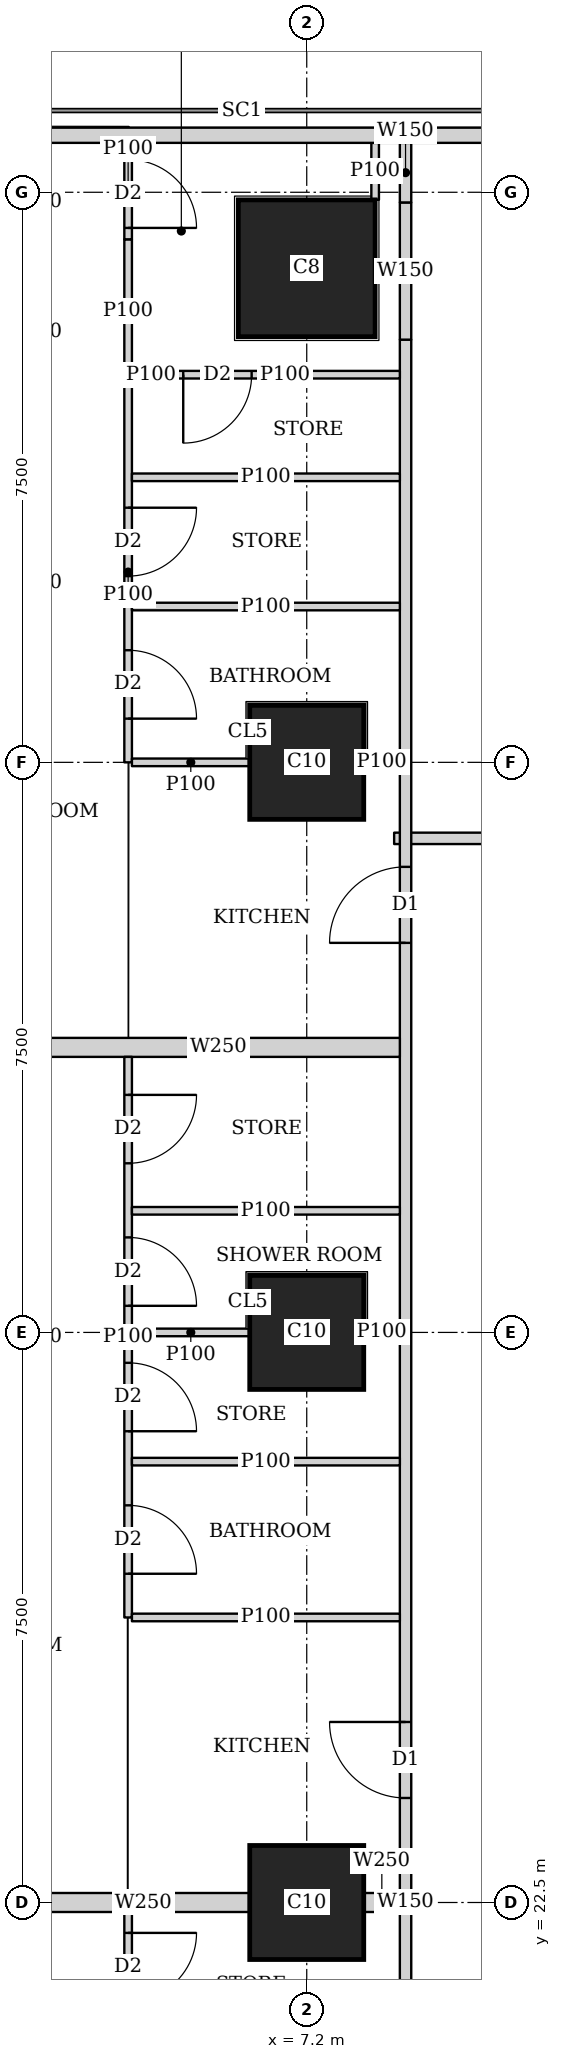
"""IFC4 building model, lengths in metres.
Left out: names, types, materials, properties, quantities, classifications, styles, units other than length and angle.
Written with IfcOpenShell. Run it as: python <this file> out.ifc"""

import sys

from ifc_helpers import new_model, si_unit, direction, frame, frame_2d, origin, origin_2d, place, context, subcontext, project, spatial, rectangle, extrude, element, fill, save


model = new_model("IFC4")
c1 = context("Model", 3, precision=1e-05, world=origin(), true_north=direction((0.0, 1.0)))
c2 = subcontext(c1, "Body", "Model", "MODEL_VIEW")
j1 = project(units=[si_unit("LENGTHUNIT", "METRE"), si_unit("PLANEANGLEUNIT", "RADIAN")], contexts=[c1])
p1 = place(None, origin())
s1 = spatial("IfcSite", under=j1, at=p1, CompositionType="ELEMENT")
p2 = place(p1, origin())
s2 = spatial("IfcBuilding", under=s1, at=p2, CompositionType="ELEMENT")
p3 = place(p2, frame((0.0, 0.0, 184.55)))
s3 = spatial("IfcBuildingStorey", under=s2, at=p3, CompositionType="ELEMENT", Elevation=184.55)
for number, where, z_axis, x_axis in (
    (1, (7.2, 22.5, 0.0), (0.0, 0.0, 1.0), (1.0, 0.0, 0.0)),
    (2, (7.2, 30.0, 0.0), (0.0, 0.0, 1.0), (1.0, 0.0, 0.0)),
    (3, (7.2, 37.5, 0.0), (0.0, 0.0, 1.0), (1.0, 0.0, 0.0)),
):
    element("IfcColumn", number, at=place(p3, frame(where, z_axis=z_axis, x_axis=x_axis)), inside=s3, PredefinedType="COLUMN", context=c2, shape_type="SweptSolid", body=[
        extrude(rectangle(XDim=1.5, YDim=1.5, at=origin_2d()), origin(), (0.0, 0.0, 1.0), 3.75),
    ])
p4 = place(p3, frame((7.2, 44.0, 0.0), z_axis=(0.0, 0.0, 1.0), x_axis=(1.0, 0.0, 0.0)))
e4 = element("IfcColumn", 4, at=p4, inside=s3, PredefinedType="COLUMN", context=c2, shape_type="SweptSolid", body=[
    extrude(rectangle(XDim=1.8, YDim=1.8, at=origin_2d()), origin(), (0.0, 0.0, 1.0), 3.75),
])
p5 = place(p3, frame((40.106, 45.75, 0.0), z_axis=(0.0, 0.0, 1.0), x_axis=(-1.0, 0.0, 0.0)))
e5 = element("IfcWall", 5, at=p5, inside=s3, PredefinedType="SOLIDWALL", context=c2, shape_type="SweptSolid", body=[
    extrude(rectangle(XDim=37.943, YDim=0.2, at=frame_2d((18.971, 0.0))), origin(), (0.0, 0.0, 1.0), 3.45),
])
p6 = place(p5, frame((8.606, 0.0, 0.9)))
e6 = element("IfcOpeningElement", 6, at=p6, cuts=e5, PredefinedType="OPENING", context=c2, shape_type="SweptSolid", body=[
    extrude(rectangle(XDim=1.8, YDim=1.5, at=frame_2d((0.9, 0.75))), frame((0.0, 0.11, 0.0), z_axis=(0.0, -1.0, 0.0), x_axis=(1.0, 0.0, 0.0)), (0.0, 0.0, 1.0), 0.22),
])
p7 = place(p5, frame((12.206, 0.0, 0.9)))
e7 = element("IfcOpeningElement", 7, at=p7, cuts=e5, PredefinedType="OPENING", context=c2, shape_type="SweptSolid", body=[
    extrude(rectangle(XDim=1.8, YDim=1.5, at=frame_2d((0.9, 0.75))), frame((0.0, 0.11, 0.0), z_axis=(0.0, -1.0, 0.0), x_axis=(1.0, 0.0, 0.0)), (0.0, 0.0, 1.0), 0.22),
])
p8 = place(p5, frame((15.806, 0.0, 0.9)))
e8 = element("IfcOpeningElement", 8, at=p8, cuts=e5, PredefinedType="OPENING", context=c2, shape_type="SweptSolid", body=[
    extrude(rectangle(XDim=1.8, YDim=1.5, at=frame_2d((0.9, 0.75))), frame((0.0, 0.11, 0.0), z_axis=(0.0, -1.0, 0.0), x_axis=(1.0, 0.0, 0.0)), (0.0, 0.0, 1.0), 0.22),
])
p9 = place(p5, frame((19.406, 0.0, 0.9)))
e9 = element("IfcOpeningElement", 9, at=p9, cuts=e5, PredefinedType="OPENING", context=c2, shape_type="SweptSolid", body=[
    extrude(rectangle(XDim=1.8, YDim=1.5, at=frame_2d((0.9, 0.75))), frame((0.0, 0.11, 0.0), z_axis=(0.0, -1.0, 0.0), x_axis=(1.0, 0.0, 0.0)), (0.0, 0.0, 1.0), 0.22),
])
p10 = place(p5, frame((23.006, 0.0, 0.9)))
e10 = element("IfcOpeningElement", 10, at=p10, cuts=e5, PredefinedType="OPENING", context=c2, shape_type="SweptSolid", body=[
    extrude(rectangle(XDim=1.8, YDim=1.5, at=frame_2d((0.9, 0.75))), frame((0.0, 0.11, 0.0), z_axis=(0.0, -1.0, 0.0), x_axis=(1.0, 0.0, 0.0)), (0.0, 0.0, 1.0), 0.22),
])
p11 = place(p5, frame((26.606, 0.0, 0.9)))
e11 = element("IfcOpeningElement", 11, at=p11, cuts=e5, PredefinedType="OPENING", context=c2, shape_type="SweptSolid", body=[
    extrude(rectangle(XDim=1.8, YDim=1.5, at=frame_2d((0.9, 0.75))), frame((0.0, 0.11, 0.0), z_axis=(0.0, -1.0, 0.0), x_axis=(1.0, 0.0, 0.0)), (0.0, 0.0, 1.0), 0.22),
])
p12 = place(p3, frame((8.5, 1.964, 0.0), z_axis=(0.0, 0.0, 1.0), x_axis=(0.0, 1.0, 0.0)))
e12 = element("IfcWall", 12, at=p12, inside=s3, PredefinedType="SOLIDWALL", context=c2, shape_type="SweptSolid", body=[
    extrude(rectangle(XDim=41.097, YDim=0.15, at=frame_2d((20.548, 0.0))), origin(), (0.0, 0.0, 1.0), 3.45),
])
p13 = place(p12, frame((10.661, 0.0, 0.0)))
e13 = element("IfcOpeningElement", 13, at=p13, cuts=e12, PredefinedType="OPENING", context=c2, shape_type="SweptSolid", body=[
    extrude(rectangle(XDim=1.0, YDim=2.1, at=frame_2d((0.5, 1.05))), frame((0.0, 0.085, 0.0), z_axis=(0.0, -1.0, 0.0), x_axis=(1.0, 0.0, 0.0)), (0.0, 0.0, 1.0), 0.17),
])
p14 = place(p12, frame((14.411, 0.0, 0.0)))
e14 = element("IfcOpeningElement", 14, at=p14, cuts=e12, PredefinedType="OPENING", context=c2, shape_type="SweptSolid", body=[
    extrude(rectangle(XDim=1.0, YDim=2.1, at=frame_2d((0.5, 1.05))), frame((0.0, 0.085, 0.0), z_axis=(0.0, -1.0, 0.0), x_axis=(1.0, 0.0, 0.0)), (0.0, 0.0, 1.0), 0.17),
])
p15 = place(p12, frame((21.911, 0.0, 0.0)))
e15 = element("IfcOpeningElement", 15, at=p15, cuts=e12, PredefinedType="OPENING", context=c2, shape_type="SweptSolid", body=[
    extrude(rectangle(XDim=1.0, YDim=2.1, at=frame_2d((0.5, 1.05))), frame((0.0, 0.085, 0.0), z_axis=(0.0, -1.0, 0.0), x_axis=(1.0, 0.0, 0.0)), (0.0, 0.0, 1.0), 0.17),
])
p16 = place(p12, frame((33.161, 0.0, 0.0)))
e16 = element("IfcOpeningElement", 16, at=p16, cuts=e12, PredefinedType="OPENING", context=c2, shape_type="SweptSolid", body=[
    extrude(rectangle(XDim=1.0, YDim=2.1, at=frame_2d((0.5, 1.05))), frame((0.0, 0.085, 0.0), z_axis=(0.0, -1.0, 0.0), x_axis=(1.0, 0.0, 0.0)), (0.0, 0.0, 1.0), 0.17),
])
p17 = place(p3, frame((8.5, 43.061, 0.0), z_axis=(0.0, 0.0, 1.0), x_axis=(0.0, 1.0, 0.0)))
e17 = element("IfcWall", 17, at=p17, inside=s3, PredefinedType="SOLIDWALL", context=c2, shape_type="SweptSolid", body=[
    extrude(rectangle(XDim=1.805, YDim=0.15, at=frame_2d((0.902, 0.0))), origin(), (0.0, 0.0, 1.0), 2.05),
])
p18 = place(p3, frame((8.5, 44.866, 0.0), z_axis=(0.0, 0.0, 1.0), x_axis=(0.0, 1.0, 0.0)))
e18 = element("IfcWall", 18, at=p18, inside=s3, PredefinedType="SOLIDWALL", context=c2, shape_type="SweptSolid", body=[
    extrude(rectangle(XDim=0.784, YDim=0.15, at=frame_2d((0.392, 0.0))), origin(), (0.0, 0.0, 1.0), 3.45),
])
p19 = place(p3, frame((8.35, 36.5, 0.0), z_axis=(0.0, 0.0, 1.0), x_axis=(1.0, 0.0, 0.0)))
e19 = element("IfcWall", 19, at=p19, inside=s3, PredefinedType="SOLIDWALL", context=c2, shape_type="SweptSolid", body=[
    extrude(rectangle(XDim=26.415, YDim=0.15, at=frame_2d((13.208, 0.0))), origin(), (0.0, 0.0, 1.0), 3.45),
])
p20 = place(p19, frame((2.6, 0.0, 0.0)))
e20 = element("IfcOpeningElement", 20, at=p20, cuts=e19, PredefinedType="OPENING", context=c2, shape_type="SweptSolid", body=[
    extrude(rectangle(XDim=1.0, YDim=2.1, at=frame_2d((0.5, 1.05))), frame((0.0, 0.085, 0.0), z_axis=(0.0, -1.0, 0.0), x_axis=(1.0, 0.0, 0.0)), (0.0, 0.0, 1.0), 0.17),
])
p21 = place(p19, frame((14.75, 0.0, 0.0)))
e21 = element("IfcOpeningElement", 21, at=p21, cuts=e19, PredefinedType="OPENING", context=c2, shape_type="SweptSolid", body=[
    extrude(rectangle(XDim=1.0, YDim=2.1, at=frame_2d((0.5, 1.05))), frame((0.0, 0.085, 0.0), z_axis=(0.0, -1.0, 0.0), x_axis=(1.0, 0.0, 0.0)), (0.0, 0.0, 1.0), 0.17),
])
p22 = place(p19, frame((23.923, 0.0, 0.0)))
e22 = element("IfcOpeningElement", 22, at=p22, cuts=e19, PredefinedType="OPENING", context=c2, shape_type="SweptSolid", body=[
    extrude(rectangle(XDim=1.0, YDim=2.1, at=frame_2d((0.5, 1.05))), frame((0.0, 0.085, 0.0), z_axis=(0.0, -1.0, 0.0), x_axis=(1.0, 0.0, 0.0)), (0.0, 0.0, 1.0), 0.17),
])
p23 = place(p3, frame((8.1, 45.65, 0.0), z_axis=(0.0, 0.0, 1.0), x_axis=(0.0, -1.0, 0.0)))
e23 = element("IfcWall", 23, at=p23, inside=s3, PredefinedType="PARTITIONING", context=c2, shape_type="SweptSolid", body=[
    extrude(rectangle(XDim=0.749, YDim=0.1, at=frame_2d((0.375, 0.0))), origin(), (0.0, 0.0, 1.0), 3.45),
])
p24 = place(p3, frame((4.85, 18.75, 0.0), z_axis=(0.0, 0.0, 1.0), x_axis=(0.0, 1.0, 0.0)))
e24 = element("IfcWall", 24, at=p24, inside=s3, PredefinedType="PARTITIONING", context=c2, shape_type="SweptSolid", body=[
    extrude(rectangle(XDim=3.625, YDim=0.1, at=frame_2d((1.812, 0.0))), origin(), (0.0, 0.0, 1.0), 3.45),
])
p25 = place(p24, frame((0.575, 0.0, 0.0)))
e25 = element("IfcOpeningElement", 25, at=p25, cuts=e24, PredefinedType="OPENING", context=c2, shape_type="SweptSolid", body=[
    extrude(rectangle(XDim=0.9, YDim=2.1, at=frame_2d((0.45, 1.05))), frame((0.0, 0.06, 0.0), z_axis=(0.0, -1.0, 0.0), x_axis=(1.0, 0.0, 0.0)), (0.0, 0.0, 1.0), 0.12),
])
p26 = place(p24, frame((2.45, 0.0, 0.0)))
e26 = element("IfcOpeningElement", 26, at=p26, cuts=e24, PredefinedType="OPENING", context=c2, shape_type="SweptSolid", body=[
    extrude(rectangle(XDim=0.9, YDim=2.1, at=frame_2d((0.45, 1.05))), frame((0.0, 0.06, 0.0), z_axis=(0.0, -1.0, 0.0), x_axis=(1.0, 0.0, 0.0)), (0.0, 0.0, 1.0), 0.12),
])
p27 = place(p3, frame((4.85, 26.25, 0.0), z_axis=(0.0, 0.0, 1.0), x_axis=(0.0, 1.0, 0.0)))
e27 = element("IfcWall", 27, at=p27, inside=s3, PredefinedType="PARTITIONING", context=c2, shape_type="SweptSolid", body=[
    extrude(rectangle(XDim=7.375, YDim=0.1, at=frame_2d((3.688, 0.0))), origin(), (0.0, 0.0, 1.0), 3.45),
])
p28 = place(p27, frame((0.575, 0.0, 0.0)))
e28 = element("IfcOpeningElement", 28, at=p28, cuts=e27, PredefinedType="OPENING", context=c2, shape_type="SweptSolid", body=[
    extrude(rectangle(XDim=0.9, YDim=2.1, at=frame_2d((0.45, 1.05))), frame((0.0, 0.06, 0.0), z_axis=(0.0, -1.0, 0.0), x_axis=(1.0, 0.0, 0.0)), (0.0, 0.0, 1.0), 0.12),
])
p29 = place(p27, frame((4.1, 0.0, 0.0)))
e29 = element("IfcOpeningElement", 29, at=p29, cuts=e27, PredefinedType="OPENING", context=c2, shape_type="SweptSolid", body=[
    extrude(rectangle(XDim=0.9, YDim=2.1, at=frame_2d((0.45, 1.05))), frame((0.0, 0.06, 0.0), z_axis=(0.0, -1.0, 0.0), x_axis=(1.0, 0.0, 0.0)), (0.0, 0.0, 1.0), 0.12),
])
p30 = place(p27, frame((2.45, 0.0, 0.0)))
e30 = element("IfcOpeningElement", 30, at=p30, cuts=e27, PredefinedType="OPENING", context=c2, shape_type="SweptSolid", body=[
    extrude(rectangle(XDim=0.9, YDim=2.1, at=frame_2d((0.45, 1.05))), frame((0.0, 0.06, 0.0), z_axis=(0.0, -1.0, 0.0), x_axis=(1.0, 0.0, 0.0)), (0.0, 0.0, 1.0), 0.12),
])
p31 = place(p27, frame((5.975, 0.0, 0.0)))
e31 = element("IfcOpeningElement", 31, at=p31, cuts=e27, PredefinedType="OPENING", context=c2, shape_type="SweptSolid", body=[
    extrude(rectangle(XDim=0.9, YDim=2.1, at=frame_2d((0.45, 1.05))), frame((0.0, 0.06, 0.0), z_axis=(0.0, -1.0, 0.0), x_axis=(1.0, 0.0, 0.0)), (0.0, 0.0, 1.0), 0.12),
])
p32 = place(p3, frame((4.9, 26.25, 0.0), z_axis=(0.0, 0.0, 1.0), x_axis=(1.0, 0.0, 0.0)))
e32 = element("IfcWall", 32, at=p32, inside=s3, PredefinedType="PARTITIONING", context=c2, shape_type="SweptSolid", body=[
    extrude(rectangle(XDim=3.525, YDim=0.1, at=frame_2d((1.763, 0.0))), origin(), (0.0, 0.0, 1.0), 3.45),
])
p33 = place(p3, frame((4.9, 30.0, 0.0), z_axis=(0.0, 0.0, 1.0), x_axis=(1.0, 0.0, 0.0)))
e33 = element("IfcWall", 33, at=p33, inside=s3, PredefinedType="PARTITIONING", context=c2, shape_type="SweptSolid", body=[
    extrude(rectangle(XDim=1.549, YDim=0.1, at=frame_2d((0.774, 0.0))), origin(), (0.0, 0.0, 1.0), 3.45),
])
p34 = place(p3, frame((7.951, 30.0, 0.0), z_axis=(0.0, 0.0, 1.0), x_axis=(1.0, 0.0, 0.0)))
e34 = element("IfcWall", 34, at=p34, inside=s3, PredefinedType="PARTITIONING", context=c2, shape_type="SweptSolid", body=[
    extrude(rectangle(XDim=0.474, YDim=0.1, at=frame_2d((0.237, 0.0))), origin(), (0.0, 0.0, 1.0), 3.45),
])
for number, where, z_axis, x_axis in (
    (35, (4.9, 28.3, 0.0), (0.0, 0.0, 1.0), (1.0, 0.0, 0.0)),
    (36, (4.9, 31.6, 0.0), (0.0, 0.0, 1.0), (1.0, 0.0, 0.0)),
):
    element("IfcWall", number, at=place(p3, frame(where, z_axis=z_axis, x_axis=x_axis)), inside=s3, PredefinedType="PARTITIONING", context=c2, shape_type="SweptSolid", body=[
        extrude(rectangle(XDim=3.525, YDim=0.1, at=frame_2d((1.763, 0.0))), origin(), (0.0, 0.0, 1.0), 3.45),
    ])
p35 = place(p3, frame((3.65, 22.5, 0.0), z_axis=(0.0, 0.0, 1.0), x_axis=(1.0, 0.0, 0.0)))
e37 = element("IfcWall", 37, at=p35, inside=s3, PredefinedType="SOLIDWALL", context=c2, shape_type="SweptSolid", body=[
    extrude(rectangle(XDim=2.799, YDim=0.25, at=frame_2d((1.399, 0.0))), origin(), (0.0, 0.0, 1.0), 3.45),
])
p36 = place(p3, frame((7.951, 22.5, 0.0), z_axis=(0.0, 0.0, 1.0), x_axis=(1.0, 0.0, 0.0)))
e38 = element("IfcWall", 38, at=p36, inside=s3, PredefinedType="SOLIDWALL", context=c2, shape_type="SweptSolid", body=[
    extrude(rectangle(XDim=0.474, YDim=0.25, at=frame_2d((0.237, 0.0))), origin(), (0.0, 0.0, 1.0), 3.45),
])
p37 = place(p3, frame((4.85, 37.5, 0.0), z_axis=(0.0, 0.0, 1.0), x_axis=(0.0, 1.0, 0.0)))
e39 = element("IfcWall", 39, at=p37, inside=s3, PredefinedType="PARTITIONING", context=c2, shape_type="SweptSolid", body=[
    extrude(rectangle(XDim=5.007, YDim=0.1, at=frame_2d((2.503, 0.0))), origin(), (0.0, 0.0, 1.0), 3.45),
])
p38 = place(p37, frame((0.575, 0.0, 0.0)))
e40 = element("IfcOpeningElement", 40, at=p38, cuts=e39, PredefinedType="OPENING", context=c2, shape_type="SweptSolid", body=[
    extrude(rectangle(XDim=0.9, YDim=2.1, at=frame_2d((0.45, 1.05))), frame((0.0, 0.06, 0.0), z_axis=(0.0, -1.0, 0.0), x_axis=(1.0, 0.0, 0.0)), (0.0, 0.0, 1.0), 0.12),
])
p39 = place(p37, frame((2.45, 0.0, 0.0)))
e41 = element("IfcOpeningElement", 41, at=p39, cuts=e39, PredefinedType="OPENING", context=c2, shape_type="SweptSolid", body=[
    extrude(rectangle(XDim=0.9, YDim=2.1, at=frame_2d((0.45, 1.05))), frame((0.0, 0.06, 0.0), z_axis=(0.0, -1.0, 0.0), x_axis=(1.0, 0.0, 0.0)), (0.0, 0.0, 1.0), 0.12),
])
p40 = place(p3, frame((4.85, 42.507, 0.0), z_axis=(0.0, 0.0, 1.0), x_axis=(0.0, 1.0, 0.0)))
e42 = element("IfcWall", 42, at=p40, inside=s3, PredefinedType="PARTITIONING", context=c2, shape_type="SweptSolid", body=[
    extrude(rectangle(XDim=1.874, YDim=0.1, at=frame_2d((0.937, 0.0))), origin(), (0.0, 0.0, 1.0), 2.05),
])
p41 = place(p3, frame((4.85, 44.381, 0.0), z_axis=(0.0, 0.0, 1.0), x_axis=(0.0, 1.0, 0.0)))
e43 = element("IfcWall", 43, at=p41, inside=s3, PredefinedType="PARTITIONING", context=c2, shape_type="SweptSolid", body=[
    extrude(rectangle(XDim=1.269, YDim=0.1, at=frame_2d((0.634, 0.0))), origin(), (0.0, 0.0, 1.0), 3.45),
])
p42 = place(p41, frame((0.15, 0.0, 0.0)))
e44 = element("IfcOpeningElement", 44, at=p42, cuts=e43, PredefinedType="OPENING", context=c2, shape_type="SweptSolid", body=[
    extrude(rectangle(XDim=0.9, YDim=2.1, at=frame_2d((0.45, 1.05))), frame((0.0, 0.06, 0.0), z_axis=(0.0, -1.0, 0.0), x_axis=(1.0, 0.0, 0.0)), (0.0, 0.0, 1.0), 0.12),
])
p43 = place(p3, frame((4.9, 37.5, 0.0), z_axis=(0.0, 0.0, 1.0), x_axis=(1.0, 0.0, 0.0)))
e45 = element("IfcWall", 45, at=p43, inside=s3, PredefinedType="PARTITIONING", context=c2, shape_type="SweptSolid", body=[
    extrude(rectangle(XDim=1.549, YDim=0.1, at=frame_2d((0.774, 0.0))), origin(), (0.0, 0.0, 1.0), 3.45),
])
p44 = place(p3, frame((7.951, 37.5, 0.0), z_axis=(0.0, 0.0, 1.0), x_axis=(1.0, 0.0, 0.0)))
e46 = element("IfcWall", 46, at=p44, inside=s3, PredefinedType="PARTITIONING", context=c2, shape_type="SweptSolid", body=[
    extrude(rectangle(XDim=0.474, YDim=0.1, at=frame_2d((0.237, 0.0))), origin(), (0.0, 0.0, 1.0), 3.45),
])
for number, where, z_axis, x_axis in (
    (47, (4.9, 41.25, 0.0), (0.0, 0.0, 1.0), (1.0, 0.0, 0.0)),
    (48, (4.9, 39.55, 0.0), (0.0, 0.0, 1.0), (1.0, 0.0, 0.0)),
):
    element("IfcWall", number, at=place(p3, frame(where, z_axis=z_axis, x_axis=x_axis)), inside=s3, PredefinedType="PARTITIONING", context=c2, shape_type="SweptSolid", body=[
        extrude(rectangle(XDim=3.525, YDim=0.1, at=frame_2d((1.763, 0.0))), origin(), (0.0, 0.0, 1.0), 3.45),
    ])
p45 = place(p3, frame((3.65, 33.75, 0.0), z_axis=(0.0, 0.0, 1.0), x_axis=(1.0, 0.0, 0.0)))
e49 = element("IfcWall", 49, at=p45, inside=s3, PredefinedType="SOLIDWALL", context=c2, shape_type="SweptSolid", body=[
    extrude(rectangle(XDim=4.775, YDim=0.25, at=frame_2d((2.388, 0.0))), origin(), (0.0, 0.0, 1.0), 3.45),
])
p46 = place(p3, frame((8.425, 42.6, 0.0), z_axis=(0.0, 0.0, 1.0), x_axis=(-1.0, 0.0, 0.0)))
e50 = element("IfcWall", 50, at=p46, inside=s3, PredefinedType="PARTITIONING", context=c2, shape_type="SweptSolid", body=[
    extrude(rectangle(XDim=3.022, YDim=0.1, at=frame_2d((1.511, 0.0))), origin(), (0.0, 0.0, 1.0), 3.45),
])
p47 = place(p46, frame((1.95, 0.0, 0.0)))
e51 = element("IfcOpeningElement", 51, at=p47, cuts=e50, PredefinedType="OPENING", context=c2, shape_type="SweptSolid", body=[
    extrude(rectangle(XDim=0.9, YDim=2.1, at=frame_2d((0.45, 1.05))), frame((0.0, 0.06, 0.0), z_axis=(0.0, -1.0, 0.0), x_axis=(1.0, 0.0, 0.0)), (0.0, 0.0, 1.0), 0.12),
])
p48 = place(p3, frame((5.403, 42.6, 0.0), z_axis=(0.0, 0.0, 1.0), x_axis=(-1.0, 0.0, 0.0)))
e52 = element("IfcWall", 52, at=p48, inside=s3, PredefinedType="PARTITIONING", context=c2, shape_type="SweptSolid", body=[
    extrude(rectangle(XDim=0.503, YDim=0.1, at=frame_2d((0.251, 0.0))), origin(), (0.0, 0.0, 1.0), 2.05),
])
p49 = place(p26, origin())
e53 = element("IfcDoor", 53, at=p49, inside=s3, OperationType="SINGLE_SWING_LEFT", PredefinedType="DOOR", context=c2, shape_type="SweptSolid", body=[
    extrude(rectangle(XDim=0.9, YDim=2.1, at=frame_2d((0.45, 1.05))), frame((0.0, 0.025, 0.0), z_axis=(0.0, -1.0, 0.0), x_axis=(1.0, 0.0, 0.0)), (0.0, 0.0, 1.0), 0.05),
])
fill(e26, e53)
p50 = place(p28, origin())
e54 = element("IfcDoor", 54, at=p50, inside=s3, OperationType="SINGLE_SWING_RIGHT", PredefinedType="DOOR", context=c2, shape_type="SweptSolid", body=[
    extrude(rectangle(XDim=0.9, YDim=2.1, at=frame_2d((0.45, 1.05))), frame((0.0, 0.025, 0.0), z_axis=(0.0, -1.0, 0.0), x_axis=(1.0, 0.0, 0.0)), (0.0, 0.0, 1.0), 0.05),
])
fill(e28, e54)
p51 = place(p29, origin())
e55 = element("IfcDoor", 55, at=p51, inside=s3, OperationType="SINGLE_SWING_RIGHT", PredefinedType="DOOR", context=c2, shape_type="SweptSolid", body=[
    extrude(rectangle(XDim=0.9, YDim=2.1, at=frame_2d((0.45, 1.05))), frame((0.0, 0.025, 0.0), z_axis=(0.0, -1.0, 0.0), x_axis=(1.0, 0.0, 0.0)), (0.0, 0.0, 1.0), 0.05),
])
fill(e29, e55)
p52 = place(p30, origin())
e56 = element("IfcDoor", 56, at=p52, inside=s3, OperationType="SINGLE_SWING_RIGHT", PredefinedType="DOOR", context=c2, shape_type="SweptSolid", body=[
    extrude(rectangle(XDim=0.9, YDim=2.1, at=frame_2d((0.45, 1.05))), frame((0.0, 0.025, 0.0), z_axis=(0.0, -1.0, 0.0), x_axis=(1.0, 0.0, 0.0)), (0.0, 0.0, 1.0), 0.05),
])
fill(e30, e56)
p53 = place(p31, origin())
e57 = element("IfcDoor", 57, at=p53, inside=s3, OperationType="SINGLE_SWING_LEFT", PredefinedType="DOOR", context=c2, shape_type="SweptSolid", body=[
    extrude(rectangle(XDim=0.9, YDim=2.1, at=frame_2d((0.45, 1.05))), frame((0.0, 0.025, 0.0), z_axis=(0.0, -1.0, 0.0), x_axis=(1.0, 0.0, 0.0)), (0.0, 0.0, 1.0), 0.05),
])
fill(e31, e57)
p54 = place(p15, origin())
e58 = element("IfcDoor", 58, at=p54, inside=s3, OperationType="SINGLE_SWING_RIGHT", PredefinedType="DOOR", context=c2, shape_type="SweptSolid", body=[
    extrude(rectangle(XDim=1.0, YDim=2.1, at=frame_2d((0.5, 1.05))), frame((0.0, 0.025, 0.0), z_axis=(0.0, -1.0, 0.0), x_axis=(1.0, 0.0, 0.0)), (0.0, 0.0, 1.0), 0.05),
])
fill(e15, e58)
p55 = place(p38, origin())
e59 = element("IfcDoor", 59, at=p55, inside=s3, OperationType="SINGLE_SWING_RIGHT", PredefinedType="DOOR", context=c2, shape_type="SweptSolid", body=[
    extrude(rectangle(XDim=0.9, YDim=2.1, at=frame_2d((0.45, 1.05))), frame((0.0, 0.025, 0.0), z_axis=(0.0, -1.0, 0.0), x_axis=(1.0, 0.0, 0.0)), (0.0, 0.0, 1.0), 0.05),
])
fill(e40, e59)
p56 = place(p42, origin())
e60 = element("IfcDoor", 60, at=p56, inside=s3, OperationType="SINGLE_SWING_RIGHT", PredefinedType="DOOR", context=c2, shape_type="SweptSolid", body=[
    extrude(rectangle(XDim=0.9, YDim=2.1, at=frame_2d((0.45, 1.05))), frame((0.0, 0.025, 0.0), z_axis=(0.0, -1.0, 0.0), x_axis=(1.0, 0.0, 0.0)), (0.0, 0.0, 1.0), 0.05),
])
fill(e44, e60)
p57 = place(p39, origin())
e61 = element("IfcDoor", 61, at=p57, inside=s3, OperationType="SINGLE_SWING_LEFT", PredefinedType="DOOR", context=c2, shape_type="SweptSolid", body=[
    extrude(rectangle(XDim=0.9, YDim=2.1, at=frame_2d((0.45, 1.05))), frame((0.0, 0.025, 0.0), z_axis=(0.0, -1.0, 0.0), x_axis=(1.0, 0.0, 0.0)), (0.0, 0.0, 1.0), 0.05),
])
fill(e41, e61)
p58 = place(p16, origin())
e62 = element("IfcDoor", 62, at=p58, inside=s3, OperationType="SINGLE_SWING_LEFT", PredefinedType="DOOR", context=c2, shape_type="SweptSolid", body=[
    extrude(rectangle(XDim=1.0, YDim=2.1, at=frame_2d((0.5, 1.05))), frame((0.0, 0.025, 0.0), z_axis=(0.0, -1.0, 0.0), x_axis=(1.0, 0.0, 0.0)), (0.0, 0.0, 1.0), 0.05),
])
fill(e16, e62)
p59 = place(p47, origin())
e63 = element("IfcDoor", 63, at=p59, inside=s3, OperationType="SINGLE_SWING_RIGHT", PredefinedType="DOOR", context=c2, shape_type="SweptSolid", body=[
    extrude(rectangle(XDim=0.9, YDim=2.1, at=frame_2d((0.45, 1.05))), frame((0.0, 0.025, 0.0), z_axis=(0.0, -1.0, 0.0), x_axis=(1.0, 0.0, 0.0)), (0.0, 0.0, 1.0), 0.05),
])
fill(e51, e63)
save(model, sys.argv[1])
